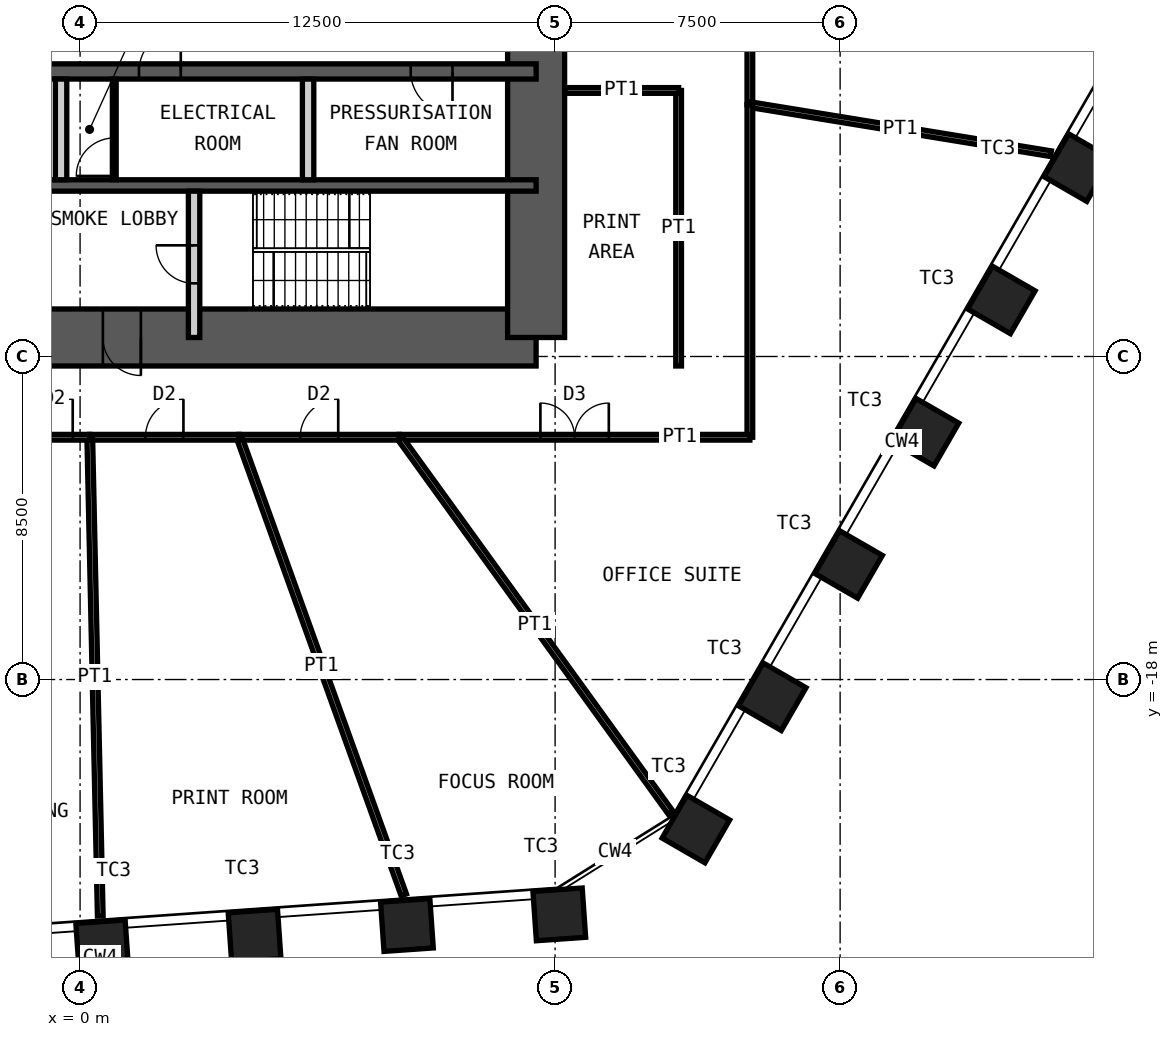
"""IFC4 building model, lengths in metres.
Left out: names, types, materials, properties, quantities, classifications, styles, units other than length and angle.
Written with IfcOpenShell. Run it as: python <this file> out.ifc"""

import sys

from ifc_helpers import new_model, si_unit, direction, frame, frame_2d, origin, origin_2d, place, context, subcontext, project, spatial, rectangle, hollow_rectangle, extrude, element, fill, save


model = new_model("IFC4")
c1 = context("Model", 3, precision=1e-05, world=origin(), true_north=direction((0.0, 1.0)))
c2 = subcontext(c1, "Body", "Model", "MODEL_VIEW")
j1 = project(units=[si_unit("LENGTHUNIT", "METRE"), si_unit("PLANEANGLEUNIT", "RADIAN")], contexts=[c1])
p1 = place(None, origin())
s1 = spatial("IfcSite", under=j1, at=p1, CompositionType="ELEMENT")
p2 = place(p1, origin())
s2 = spatial("IfcBuilding", under=s1, at=p2, CompositionType="ELEMENT")
p3 = place(p2, frame((0.0, 0.0, 107.2)))
s3 = spatial("IfcBuildingStorey", under=s2, at=p3, CompositionType="ELEMENT", Elevation=107.2)
for number, where, z_axis, x_axis in (
    (1, (26.252, -4.53, 0.0), (0.0, 0.0, 1.0), (0.5, 0.866, 0.0)),
    (2, (24.242, -8.011, 0.0), (0.0, 0.0, 1.0), (0.5, 0.866, 0.0)),
    (3, (22.233, -11.491, 0.0), (0.0, 0.0, 1.0), (0.5, 0.866, 0.0)),
    (4, (20.223, -14.972, 0.0), (0.0, 0.0, 1.0), (0.5, 0.866, 0.0)),
    (5, (18.214, -18.453, 0.0), (0.0, 0.0, 1.0), (0.5, 0.866, 0.0)),
    (6, (16.204, -21.933, 0.0), (0.0, 0.0, 1.0), (0.5, 0.866, 0.0)),
    (7, (12.61, -24.179, 0.0), (0.0, 0.0, 1.0), (0.998, 0.07, 0.0)),
    (8, (8.601, -24.46, 0.0), (0.0, 0.0, 1.0), (0.998, 0.07, 0.0)),
    (9, (4.592, -24.74, 0.0), (0.0, 0.0, 1.0), (0.998, 0.07, 0.0)),
    (10, (0.582, -25.02, 0.0), (0.0, 0.0, 1.0), (0.998, 0.07, 0.0)),
):
    element("IfcColumn", number, at=place(p3, frame(where, z_axis=z_axis, x_axis=x_axis)), inside=s3, PredefinedType="COLUMN", context=c2, shape_type="SweptSolid", body=[
        extrude(hollow_rectangle(XDim=1.3, YDim=1.3, WallThickness=0.1, at=origin_2d()), origin(), (0.0, 0.0, 1.0), 4.2),
    ])
p4 = place(p3, frame((-12.0, -9.0, 0.0), z_axis=(0.0, 0.0, 1.0), x_axis=(1.0, 0.0, 0.0)))
e11 = element("IfcWall", 11, at=p4, inside=s3, PredefinedType="SHEAR", context=c2, shape_type="SweptSolid", body=[
    extrude(rectangle(XDim=24.0, YDim=1.5, at=frame_2d((12.0, 0.0))), origin(), (0.0, 0.0, 1.0), 4.2),
])
p5 = place(p4, frame((1.35, 0.0, 0.0)))
e12 = element("IfcOpeningElement", 12, at=p5, cuts=e11, PredefinedType="OPENING", context=c2, shape_type="SweptSolid", body=[
    extrude(rectangle(XDim=1.0, YDim=2.1, at=frame_2d((0.5, 1.05))), frame((0.0, 0.76, 0.0), z_axis=(0.0, -1.0, 0.0), x_axis=(1.0, 0.0, 0.0)), (0.0, 0.0, 1.0), 1.52),
])
p6 = place(p4, frame((5.325, 0.0, 0.0)))
e13 = element("IfcOpeningElement", 13, at=p6, cuts=e11, PredefinedType="OPENING", context=c2, shape_type="SweptSolid", body=[
    extrude(rectangle(XDim=1.15, YDim=2.1, at=frame_2d((0.575, 1.05))), frame((0.0, 0.76, 0.0), z_axis=(0.0, -1.0, 0.0), x_axis=(1.0, 0.0, 0.0)), (0.0, 0.0, 1.0), 1.52),
])
p7 = place(p4, frame((12.6, 0.0, 0.0)))
e14 = element("IfcOpeningElement", 14, at=p7, cuts=e11, PredefinedType="OPENING", context=c2, shape_type="SweptSolid", body=[
    extrude(rectangle(XDim=1.0, YDim=2.1, at=frame_2d((0.5, 1.05))), frame((0.0, 0.76, 0.0), z_axis=(0.0, -1.0, 0.0), x_axis=(1.0, 0.0, 0.0)), (0.0, 0.0, 1.0), 1.52),
])
p8 = place(p3, frame((12.0, -9.0, 0.0), z_axis=(0.0, 0.0, 1.0), x_axis=(0.0, 1.0, 0.0)))
e15 = element("IfcWall", 15, at=p8, inside=s3, PredefinedType="SHEAR", context=c2, shape_type="SweptSolid", body=[
    extrude(rectangle(XDim=18.0, YDim=1.5, at=frame_2d((9.0, 0.0))), origin(), (0.0, 0.0, 1.0), 4.2),
])
p9 = place(p8, frame((8.1, 0.0, 0.0)))
e16 = element("IfcOpeningElement", 16, at=p9, cuts=e15, PredefinedType="OPENING", context=c2, shape_type="SweptSolid", body=[
    extrude(rectangle(XDim=1.8, YDim=2.1, at=frame_2d((0.9, 1.05))), frame((0.0, 0.76, 0.0), z_axis=(0.0, -1.0, 0.0), x_axis=(1.0, 0.0, 0.0)), (0.0, 0.0, 1.0), 1.52),
])
p10 = place(p3, frame((-12.0, -2.0, 0.0), z_axis=(0.0, 0.0, 1.0), x_axis=(1.0, 0.0, 0.0)))
e17 = element("IfcWall", 17, at=p10, inside=s3, PredefinedType="SHEAR", context=c2, shape_type="SweptSolid", body=[
    extrude(rectangle(XDim=24.0, YDim=0.4, at=frame_2d((12.0, 0.0))), origin(), (0.0, 0.0, 1.0), 4.2),
])
p11 = place(p10, frame((1.1, 0.0, 0.0)))
e18 = element("IfcOpeningElement", 18, at=p11, cuts=e17, PredefinedType="OPENING", context=c2, shape_type="SweptSolid", body=[
    extrude(rectangle(XDim=1.1, YDim=2.1, at=frame_2d((0.55, 1.05))), frame((0.0, 0.21, 0.0), z_axis=(0.0, -1.0, 0.0), x_axis=(1.0, 0.0, 0.0)), (0.0, 0.0, 1.0), 0.42),
])
p12 = place(p10, frame((13.55, 0.0, 0.0)))
e19 = element("IfcOpeningElement", 19, at=p12, cuts=e17, PredefinedType="OPENING", context=c2, shape_type="SweptSolid", body=[
    extrude(rectangle(XDim=1.1, YDim=2.1, at=frame_2d((0.55, 1.05))), frame((0.0, 0.21, 0.0), z_axis=(0.0, -1.0, 0.0), x_axis=(1.0, 0.0, 0.0)), (0.0, 0.0, 1.0), 0.42),
])
p13 = place(p10, frame((20.7, 0.0, 0.0)))
e20 = element("IfcOpeningElement", 20, at=p13, cuts=e17, PredefinedType="OPENING", context=c2, shape_type="SweptSolid", body=[
    extrude(rectangle(XDim=1.1, YDim=2.1, at=frame_2d((0.55, 1.05))), frame((0.0, 0.21, 0.0), z_axis=(0.0, -1.0, 0.0), x_axis=(1.0, 0.0, 0.0)), (0.0, 0.0, 1.0), 0.42),
])
p14 = place(p3, frame((-12.0, -5.0, 0.0), z_axis=(0.0, 0.0, 1.0), x_axis=(1.0, 0.0, 0.0)))
e21 = element("IfcWall", 21, at=p14, inside=s3, PredefinedType="SHEAR", context=c2, shape_type="SweptSolid", body=[
    extrude(rectangle(XDim=24.0, YDim=0.3, at=frame_2d((12.0, 0.0))), origin(), (0.0, 0.0, 1.0), 4.2),
])
for number, where, z_axis, x_axis in (
    (22, (-0.5, -4.85, 0.0), (0.0, 0.0, 1.0), (0.0, 1.0, 0.0)),
    (23, (6.0, -4.85, 0.0), (0.0, 0.0, 1.0), (0.0, 1.0, 0.0)),
):
    element("IfcWall", number, at=place(p3, frame(where, z_axis=z_axis, x_axis=x_axis)), inside=s3, PredefinedType="PARTITIONING", context=c2, shape_type="SweptSolid", body=[
        extrude(rectangle(XDim=2.65, YDim=0.3, at=frame_2d((1.325, 0.0))), origin(), (0.0, 0.0, 1.0), 3.98),
    ])
p15 = place(p3, frame((3.0, -9.0, 0.0), z_axis=(0.0, 0.0, 1.0), x_axis=(0.0, 1.0, 0.0)))
e24 = element("IfcWall", 24, at=p15, inside=s3, PredefinedType="PARTITIONING", context=c2, shape_type="SweptSolid", body=[
    extrude(rectangle(XDim=3.85, YDim=0.3, at=frame_2d((1.925, 0.0))), origin(), (0.0, 0.0, 1.0), 3.98),
])
p16 = place(p15, frame((1.425, 0.0, 0.0)))
e25 = element("IfcOpeningElement", 25, at=p16, cuts=e24, PredefinedType="OPENING", context=c2, shape_type="SweptSolid", body=[
    extrude(rectangle(XDim=1.0, YDim=2.1, at=frame_2d((0.5, 1.05))), frame((0.0, 0.16, 0.0), z_axis=(0.0, -1.0, 0.0), x_axis=(1.0, 0.0, 0.0)), (0.0, 0.0, 1.0), 0.32),
])
p17 = place(p3, frame((0.9, -4.85, 0.0), z_axis=(0.0, 0.0, 1.0), x_axis=(0.0, 1.0, 0.0)))
e26 = element("IfcWall", 26, at=p17, inside=s3, PredefinedType="PARTITIONING", context=c2, shape_type="SweptSolid", body=[
    extrude(rectangle(XDim=2.65, YDim=0.1, at=frame_2d((1.325, 0.0))), origin(), (0.0, 0.0, 1.0), 3.98),
])
p18 = place(p17, frame((0.1, 0.0, 0.0)))
e27 = element("IfcOpeningElement", 27, at=p18, cuts=e26, PredefinedType="OPENING", context=c2, shape_type="SweptSolid", body=[
    extrude(rectangle(XDim=1.0, YDim=2.4, at=frame_2d((0.5, 1.2))), frame((0.0, 0.06, 0.0), z_axis=(0.0, -1.0, 0.0), x_axis=(1.0, 0.0, 0.0)), (0.0, 0.0, 1.0), 0.12),
])
p19 = place(p3, frame((17.625, 11.625, 0.0), z_axis=(0.0, 0.0, 1.0), x_axis=(0.0, -1.0, 0.0)))
e28 = element("IfcWall", 28, at=p19, inside=s3, PredefinedType="PARTITIONING", context=c2, shape_type="SweptSolid", body=[
    extrude(rectangle(XDim=14.498, YDim=0.15, at=frame_2d((7.249, 0.0))), origin(), (0.0, 0.0, 1.0), 4.03),
])
p20 = place(p19, frame((6.349, 0.0, 0.0)))
e29 = element("IfcOpeningElement", 29, at=p20, cuts=e28, PredefinedType="OPENING", context=c2, shape_type="SweptSolid", body=[
    extrude(rectangle(XDim=1.8, YDim=2.4, at=frame_2d((0.9, 1.2))), frame((0.0, 0.085, 0.0), z_axis=(0.0, -1.0, 0.0), x_axis=(1.0, 0.0, 0.0)), (0.0, 0.0, 1.0), 0.17),
])
p21 = place(p3, frame((25.547, -4.164, 0.0), z_axis=(0.0, 0.0, 1.0), x_axis=(-0.986975392039, 0.160871301072, 0.0)))
e30 = element("IfcWall", 30, at=p21, inside=s3, PredefinedType="PARTITIONING", context=c2, shape_type="SweptSolid", body=[
    extrude(rectangle(XDim=8.027, YDim=0.15, at=frame_2d((4.013, 0.0))), origin(), (0.0, 0.0, 1.0), 4.03),
])
p22 = place(p3, frame((17.625, -2.873, 0.0), z_axis=(0.0, 0.0, 1.0), x_axis=(0.0, -1.0, 0.0)))
e31 = element("IfcWall", 31, at=p22, inside=s3, PredefinedType="PARTITIONING", context=c2, shape_type="SweptSolid", body=[
    extrude(rectangle(XDim=8.752, YDim=0.15, at=frame_2d((4.376, 0.0))), origin(), (0.0, 0.0, 1.0), 4.03),
])
p23 = place(p3, frame((17.625, -11.625, 0.0), z_axis=(0.0, 0.0, 1.0), x_axis=(-1.0, 0.0, 0.0)))
e32 = element("IfcWall", 32, at=p23, inside=s3, PredefinedType="PARTITIONING", context=c2, shape_type="SweptSolid", body=[
    extrude(rectangle(XDim=9.224, YDim=0.15, at=frame_2d((4.612, 0.0))), origin(), (0.0, 0.0, 1.0), 4.03),
])
p24 = place(p23, frame((3.712, 0.0, 0.0)))
e33 = element("IfcOpeningElement", 33, at=p24, cuts=e32, PredefinedType="OPENING", context=c2, shape_type="SweptSolid", body=[
    extrude(rectangle(XDim=1.8, YDim=2.4, at=frame_2d((0.9, 1.2))), frame((0.0, 0.085, 0.0), z_axis=(0.0, -1.0, 0.0), x_axis=(1.0, 0.0, 0.0)), (0.0, 0.0, 1.0), 0.17),
])
p25 = place(p3, frame((15.54, -21.502, 0.0), z_axis=(0.0, 0.0, 1.0), x_axis=(-0.585731902034, 0.810504866697, 0.0)))
e34 = element("IfcWall", 34, at=p25, inside=s3, PredefinedType="PARTITIONING", context=c2, shape_type="SweptSolid", body=[
    extrude(rectangle(XDim=12.187, YDim=0.15, at=frame_2d((6.093, 0.0))), origin(), (0.0, 0.0, 1.0), 2.93),
])
p26 = place(p3, frame((8.401, -11.625, 0.0), z_axis=(0.0, 0.0, 1.0), x_axis=(-1.0, 0.0, 0.0)))
e35 = element("IfcWall", 35, at=p26, inside=s3, PredefinedType="PARTITIONING", context=c2, shape_type="SweptSolid", body=[
    extrude(rectangle(XDim=4.217, YDim=0.15, at=frame_2d((2.109, 0.0))), origin(), (0.0, 0.0, 1.0), 4.03),
])
p27 = place(p26, frame((1.609, 0.0, 0.0)))
e36 = element("IfcOpeningElement", 36, at=p27, cuts=e35, PredefinedType="OPENING", context=c2, shape_type="SweptSolid", body=[
    extrude(rectangle(XDim=1.0, YDim=2.4, at=frame_2d((0.5, 1.2))), frame((0.0, 0.085, 0.0), z_axis=(0.0, -1.0, 0.0), x_axis=(1.0, 0.0, 0.0)), (0.0, 0.0, 1.0), 0.17),
])
p28 = place(p3, frame((8.518, -23.667, 0.0), z_axis=(0.0, 0.0, 1.0), x_axis=(-0.338635030469, 0.940917805198, 0.0)))
e37 = element("IfcWall", 37, at=p28, inside=s3, PredefinedType="PARTITIONING", context=c2, shape_type="SweptSolid", body=[
    extrude(rectangle(XDim=12.798, YDim=0.15, at=frame_2d((6.399, 0.0))), origin(), (0.0, 0.0, 1.0), 3.33),
])
p29 = place(p3, frame((4.184, -11.625, 0.0), z_axis=(0.0, 0.0, 1.0), x_axis=(-1.0, 0.0, 0.0)))
e38 = element("IfcWall", 38, at=p29, inside=s3, PredefinedType="PARTITIONING", context=c2, shape_type="SweptSolid", body=[
    extrude(rectangle(XDim=3.929, YDim=0.15, at=frame_2d((1.965, 0.0))), origin(), (0.0, 0.0, 1.0), 4.03),
])
p30 = place(p29, frame((1.465, 0.0, 0.0)))
e39 = element("IfcOpeningElement", 39, at=p30, cuts=e38, PredefinedType="OPENING", context=c2, shape_type="SweptSolid", body=[
    extrude(rectangle(XDim=1.0, YDim=2.4, at=frame_2d((0.5, 1.2))), frame((0.0, 0.085, 0.0), z_axis=(0.0, -1.0, 0.0), x_axis=(1.0, 0.0, 0.0)), (0.0, 0.0, 1.0), 0.17),
])
p31 = place(p3, frame((0.531, -24.222, 0.0), z_axis=(0.0, 0.0, 1.0), x_axis=(-0.021933557026, 0.999759430601, 0.0)))
e40 = element("IfcWall", 40, at=p31, inside=s3, PredefinedType="PARTITIONING", context=c2, shape_type="SweptSolid", body=[
    extrude(rectangle(XDim=12.6, YDim=0.15, at=frame_2d((6.3, 0.0))), origin(), (0.0, 0.0, 1.0), 3.33),
])
p32 = place(p3, frame((0.255, -11.625, 0.0), z_axis=(0.0, 0.0, 1.0), x_axis=(-1.0, 0.0, 0.0)))
e41 = element("IfcWall", 41, at=p32, inside=s3, PredefinedType="PARTITIONING", context=c2, shape_type="SweptSolid", body=[
    extrude(rectangle(XDim=1.897, YDim=0.15, at=frame_2d((0.949, 0.0))), origin(), (0.0, 0.0, 1.0), 4.03),
])
p33 = place(p32, frame((0.449, 0.0, 0.0)))
e42 = element("IfcOpeningElement", 42, at=p33, cuts=e41, PredefinedType="OPENING", context=c2, shape_type="SweptSolid", body=[
    extrude(rectangle(XDim=1.0, YDim=2.4, at=frame_2d((0.5, 1.2))), frame((0.0, 0.085, 0.0), z_axis=(0.0, -1.0, 0.0), x_axis=(1.0, 0.0, 0.0)), (0.0, 0.0, 1.0), 0.17),
])
p34 = place(p3, frame((15.75, -9.75, 0.0), z_axis=(0.0, 0.0, 1.0), x_axis=(0.0, 1.0, 0.0)))
e43 = element("IfcWall", 43, at=p34, inside=s3, PredefinedType="PARTITIONING", context=c2, shape_type="SweptSolid", body=[
    extrude(rectangle(XDim=7.25, YDim=0.15, at=frame_2d((3.625, 0.0))), origin(), (0.0, 0.0, 1.0), 4.03),
])
p35 = place(p3, frame((12.75, -2.5, 0.0), z_axis=(0.0, 0.0, 1.0), x_axis=(1.0, 0.0, 0.0)))
e44 = element("IfcWall", 44, at=p35, inside=s3, PredefinedType="PARTITIONING", context=c2, shape_type="SweptSolid", body=[
    extrude(rectangle(XDim=3.0, YDim=0.15, at=frame_2d((1.5, 0.0))), origin(), (0.0, 0.0, 1.0), 3.33),
])
p36 = place(p7, origin())
e45 = element("IfcDoor", 45, at=p36, inside=s3, OperationType="SINGLE_SWING_RIGHT", PredefinedType="DOOR", context=c2, shape_type="SweptSolid", body=[
    extrude(rectangle(XDim=1.0, YDim=2.1, at=frame_2d((0.5, 1.05))), frame((0.0, 0.025, 0.0), z_axis=(0.0, -1.0, 0.0), x_axis=(1.0, 0.0, 0.0)), (0.0, 0.0, 1.0), 0.05),
])
fill(e14, e45)
p37 = place(p16, origin())
e46 = element("IfcDoor", 46, at=p37, inside=s3, OperationType="SINGLE_SWING_LEFT", PredefinedType="DOOR", context=c2, shape_type="SweptSolid", body=[
    extrude(rectangle(XDim=1.0, YDim=2.1, at=frame_2d((0.5, 1.05))), frame((0.0, 0.025, 0.0), z_axis=(0.0, -1.0, 0.0), x_axis=(1.0, 0.0, 0.0)), (0.0, 0.0, 1.0), 0.05),
])
fill(e25, e46)
p38 = place(p12, origin())
e47 = element("IfcDoor", 47, at=p38, inside=s3, OperationType="SINGLE_SWING_LEFT", PredefinedType="DOOR", context=c2, shape_type="SweptSolid", body=[
    extrude(rectangle(XDim=1.1, YDim=2.1, at=frame_2d((0.55, 1.05))), frame((0.0, 0.025, 0.0), z_axis=(0.0, -1.0, 0.0), x_axis=(1.0, 0.0, 0.0)), (0.0, 0.0, 1.0), 0.05),
])
fill(e19, e47)
p39 = place(p13, origin())
e48 = element("IfcDoor", 48, at=p39, inside=s3, OperationType="SINGLE_SWING_RIGHT", PredefinedType="DOOR", context=c2, shape_type="SweptSolid", body=[
    extrude(rectangle(XDim=1.1, YDim=2.1, at=frame_2d((0.55, 1.05))), frame((0.0, 0.025, 0.0), z_axis=(0.0, -1.0, 0.0), x_axis=(1.0, 0.0, 0.0)), (0.0, 0.0, 1.0), 0.05),
])
fill(e20, e48)
p40 = place(p18, origin())
e49 = element("IfcDoor", 49, at=p40, inside=s3, OperationType="SINGLE_SWING_RIGHT", PredefinedType="DOOR", context=c2, shape_type="SweptSolid", body=[
    extrude(rectangle(XDim=1.0, YDim=2.4, at=frame_2d((0.5, 1.2))), frame((0.0, 0.025, 0.0), z_axis=(0.0, -1.0, 0.0), x_axis=(1.0, 0.0, 0.0)), (0.0, 0.0, 1.0), 0.05),
])
fill(e27, e49)
p41 = place(p24, origin())
e50 = element("IfcDoor", 50, at=p41, inside=s3, OperationType="DOUBLE_DOOR_DOUBLE_SWING", PredefinedType="DOOR", context=c2, shape_type="SweptSolid", body=[
    extrude(rectangle(XDim=1.8, YDim=2.4, at=frame_2d((0.9, 1.2))), frame((0.0, 0.025, 0.0), z_axis=(0.0, -1.0, 0.0), x_axis=(1.0, 0.0, 0.0)), (0.0, 0.0, 1.0), 0.05),
])
fill(e33, e50)
p42 = place(p27, origin())
e51 = element("IfcDoor", 51, at=p42, inside=s3, OperationType="SINGLE_SWING_LEFT", PredefinedType="DOOR", context=c2, shape_type="SweptSolid", body=[
    extrude(rectangle(XDim=1.0, YDim=2.4, at=frame_2d((0.5, 1.2))), frame((0.0, 0.025, 0.0), z_axis=(0.0, -1.0, 0.0), x_axis=(1.0, 0.0, 0.0)), (0.0, 0.0, 1.0), 0.05),
])
fill(e36, e51)
p43 = place(p30, origin())
e52 = element("IfcDoor", 52, at=p43, inside=s3, OperationType="SINGLE_SWING_LEFT", PredefinedType="DOOR", context=c2, shape_type="SweptSolid", body=[
    extrude(rectangle(XDim=1.0, YDim=2.4, at=frame_2d((0.5, 1.2))), frame((0.0, 0.025, 0.0), z_axis=(0.0, -1.0, 0.0), x_axis=(1.0, 0.0, 0.0)), (0.0, 0.0, 1.0), 0.05),
])
fill(e39, e52)
p44 = place(p33, origin())
e53 = element("IfcDoor", 53, at=p44, inside=s3, OperationType="SINGLE_SWING_LEFT", PredefinedType="DOOR", context=c2, shape_type="SweptSolid", body=[
    extrude(rectangle(XDim=1.0, YDim=2.4, at=frame_2d((0.5, 1.2))), frame((0.0, 0.025, 0.0), z_axis=(0.0, -1.0, 0.0), x_axis=(1.0, 0.0, 0.0)), (0.0, 0.0, 1.0), 0.05),
])
fill(e42, e53)
save(model, sys.argv[1])
